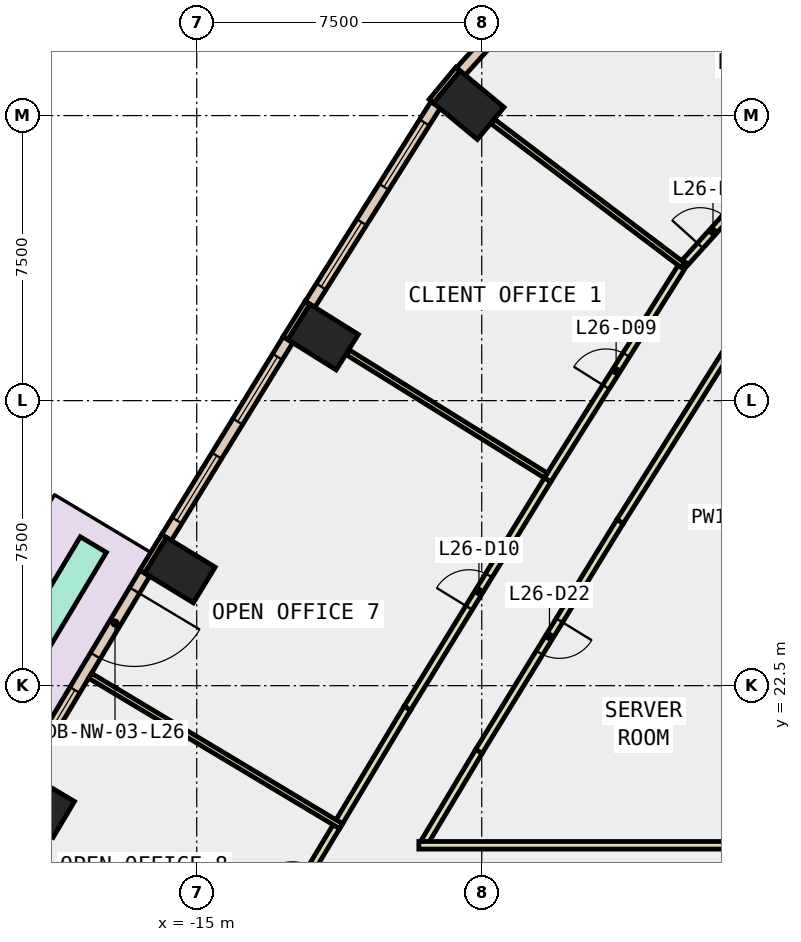
"""IFC4 building model, lengths in metres.
Left out: names, types, materials, properties, quantities, classifications, styles, units other than length and angle.
Written with IfcOpenShell. Run it as: python <this file> out.ifc"""

import sys

from ifc_helpers import new_model, si_unit, direction, frame, frame_2d, origin, origin_2d, place, context, subcontext, project, spatial, rectangle, extrude, element, fill, save


model = new_model("IFC4")
c1 = context("Model", 3, precision=1e-05, world=origin(), true_north=direction((0.0, 1.0)))
c2 = subcontext(c1, "Body", "Model", "MODEL_VIEW")
j1 = project(units=[si_unit("LENGTHUNIT", "METRE"), si_unit("PLANEANGLEUNIT", "RADIAN")], contexts=[c1])
p1 = place(None, origin())
s1 = spatial("IfcSite", under=j1, at=p1, CompositionType="ELEMENT")
p2 = place(p1, origin())
s2 = spatial("IfcBuilding", under=s1, at=p2, CompositionType="ELEMENT")
p3 = place(p2, frame((0.0, 0.0, 120.2)))
s3 = spatial("IfcBuildingStorey", under=s2, at=p3, CompositionType="ELEMENT", Elevation=120.2)
for number, where, z_axis, x_axis in (
    (1, (-7.842, 37.774, -0.4), (0.0, 0.0, 1.0), (0.638, 0.77, 0.0)),
    (2, (-11.675, 31.673, -0.4), (0.0, 0.0, 1.0), (0.53, 0.848, 0.0)),
    (3, (-15.442, 25.539, -0.4), (0.0, 0.0, 1.0), (0.52, 0.854, 0.0)),
    (4, (-19.143, 19.364, -0.4), (0.0, 0.0, 1.0), (0.51, 0.86, 0.0)),
):
    element("IfcColumn", number, at=place(p3, frame(where, z_axis=z_axis, x_axis=x_axis)), inside=s3, PredefinedType="COLUMN", context=c2, shape_type="SweptSolid", body=[
        extrude(rectangle(XDim=1.1, YDim=1.5, at=origin_2d()), origin(), (0.0, 0.0, 1.0), 4.2),
    ])
p4 = place(p3, frame((-8.126, 38.724, 0.0), z_axis=(0.0, 0.0, 1.0), x_axis=(-0.638435351024, -0.769675452748, 0.0)))
e5 = element("IfcWall", 5, at=p4, inside=s3, PredefinedType="STANDARD", context=c2, shape_type="SweptSolid", body=[
    extrude(rectangle(XDim=1.099, YDim=0.15, at=frame_2d((0.55, 0.0))), origin(), (0.0, 0.0, 1.0), 3.8),
])
p5 = place(p3, frame((-12.083, 32.577, 0.0), z_axis=(0.0, 0.0, 1.0), x_axis=(-0.52997899071, -0.848010771987, 0.0)))
e6 = element("IfcWall", 6, at=p5, inside=s3, PredefinedType="STANDARD", context=c2, shape_type="SweptSolid", body=[
    extrude(rectangle(XDim=1.1, YDim=0.15, at=frame_2d((0.55, 0.0))), origin(), (0.0, 0.0, 1.0), 3.8),
])
p6 = place(p3, frame((-15.861, 26.438, 0.0), z_axis=(0.0, 0.0, 1.0), x_axis=(-0.519869515594, -0.854245682901, 0.0)))
e7 = element("IfcWall", 7, at=p6, inside=s3, PredefinedType="STANDARD", context=c2, shape_type="SweptSolid", body=[
    extrude(rectangle(XDim=1.1, YDim=0.15, at=frame_2d((0.55, 0.0))), origin(), (0.0, 0.0, 1.0), 3.8),
])
p7 = place(p3, frame((-5.445, 41.552, 0.0), z_axis=(0.0, 0.0, 1.0), x_axis=(-0.66966434159, -0.742663900834, 0.0)))
e8 = element("IfcWall", 8, at=p7, inside=s3, PredefinedType="STANDARD", context=c2, shape_type="SweptSolid", body=[
    extrude(rectangle(XDim=3.893, YDim=0.3, at=frame_2d((1.946, 0.0))), origin(), (0.0, 0.0, 1.0), 3.8),
])
p8 = place(p7, frame((1.246, 0.0, 0.9)))
e9 = element("IfcOpeningElement", 9, at=p8, cuts=e8, PredefinedType="OPENING", context=c2, shape_type="SweptSolid", body=[
    extrude(rectangle(XDim=1.4, YDim=2.6, at=frame_2d((0.7, 1.3))), frame((0.0, 0.16, 0.0), z_axis=(0.0, -1.0, 0.0), x_axis=(1.0, 0.0, 0.0)), (0.0, 0.0, 1.0), 0.32),
])
p9 = place(p3, frame((-8.714, 37.784, 0.0), z_axis=(0.0, 0.0, 1.0), x_axis=(-0.532699467907, -0.846304482377, 0.0)))
e10 = element("IfcWall", 10, at=p9, inside=s3, PredefinedType="STANDARD", context=c2, shape_type="SweptSolid", body=[
    extrude(rectangle(XDim=6.202, YDim=0.3, at=frame_2d((3.101, 0.0))), origin(), (0.0, 0.0, 1.0), 3.8),
])
p10 = place(p9, frame((0.551, 0.0, 0.9)))
e11 = element("IfcOpeningElement", 11, at=p10, cuts=e10, PredefinedType="OPENING", context=c2, shape_type="SweptSolid", body=[
    extrude(rectangle(XDim=2.0, YDim=2.6, at=frame_2d((1.0, 1.3))), frame((0.0, 0.16, 0.0), z_axis=(0.0, -1.0, 0.0), x_axis=(1.0, 0.0, 0.0)), (0.0, 0.0, 1.0), 0.32),
])
p11 = place(p9, frame((3.652, 0.0, 0.9)))
e12 = element("IfcOpeningElement", 12, at=p11, cuts=e10, PredefinedType="OPENING", context=c2, shape_type="SweptSolid", body=[
    extrude(rectangle(XDim=2.0, YDim=2.6, at=frame_2d((1.0, 1.3))), frame((0.0, 0.16, 0.0), z_axis=(0.0, -1.0, 0.0), x_axis=(1.0, 0.0, 0.0)), (0.0, 0.0, 1.0), 0.32),
])
p12 = place(p3, frame((-12.598, 31.603, 0.0), z_axis=(0.0, 0.0, 1.0), x_axis=(-0.523417276981, -0.852076495485, 0.0)))
e13 = element("IfcWall", 13, at=p12, inside=s3, PredefinedType="STANDARD", context=c2, shape_type="SweptSolid", body=[
    extrude(rectangle(XDim=6.11, YDim=0.3, at=frame_2d((3.055, 0.0))), origin(), (0.0, 0.0, 1.0), 3.8),
])
p13 = place(p12, frame((0.527, 0.0, 0.9)))
e14 = element("IfcOpeningElement", 14, at=p13, cuts=e13, PredefinedType="OPENING", context=c2, shape_type="SweptSolid", body=[
    extrude(rectangle(XDim=2.0, YDim=2.6, at=frame_2d((1.0, 1.3))), frame((0.0, 0.16, 0.0), z_axis=(0.0, -1.0, 0.0), x_axis=(1.0, 0.0, 0.0)), (0.0, 0.0, 1.0), 0.32),
])
p14 = place(p12, frame((3.582, 0.0, 0.9)))
e15 = element("IfcOpeningElement", 15, at=p14, cuts=e13, PredefinedType="OPENING", context=c2, shape_type="SweptSolid", body=[
    extrude(rectangle(XDim=2.0, YDim=2.6, at=frame_2d((1.0, 1.3))), frame((0.0, 0.16, 0.0), z_axis=(0.0, -1.0, 0.0), x_axis=(1.0, 0.0, 0.0)), (0.0, 0.0, 1.0), 0.32),
])
p15 = place(p3, frame((-16.365, 25.458, 0.0), z_axis=(0.0, 0.0, 1.0), x_axis=(-0.514078503149, -0.857743139057, 0.0)))
e16 = element("IfcWall", 16, at=p15, inside=s3, PredefinedType="STANDARD", context=c2, shape_type="SweptSolid", body=[
    extrude(rectangle(XDim=6.11, YDim=0.3, at=frame_2d((3.055, 0.0))), origin(), (0.0, 0.0, 1.0), 3.8),
])
p16 = place(p15, frame((0.528, 0.0, 0.0)))
e17 = element("IfcOpeningElement", 17, at=p16, cuts=e16, PredefinedType="OPENING", context=c2, shape_type="SweptSolid", body=[
    extrude(rectangle(XDim=2.0, YDim=2.4, at=frame_2d((1.0, 1.2))), frame((0.0, 0.16, 0.0), z_axis=(0.0, -1.0, 0.0), x_axis=(1.0, 0.0, 0.0)), (0.0, 0.0, 1.0), 0.32),
])
p17 = place(p15, frame((3.583, 0.0, 0.9)))
e18 = element("IfcOpeningElement", 18, at=p17, cuts=e16, PredefinedType="OPENING", context=c2, shape_type="SweptSolid", body=[
    extrude(rectangle(XDim=2.0, YDim=2.6, at=frame_2d((1.0, 1.3))), frame((0.0, 0.16, 0.0), z_axis=(0.0, -1.0, 0.0), x_axis=(1.0, 0.0, 0.0)), (0.0, 0.0, 1.0), 0.32),
])
p18 = place(p3, frame((-17.72, 26.212, 0.0), z_axis=(0.0, 0.0, 1.0), x_axis=(-0.514017743989, -0.857779551437, 0.0)))
e19 = element("IfcWall", 19, at=p18, inside=s3, PredefinedType="STANDARD", context=c2, shape_type="SweptSolid", body=[
    extrude(rectangle(XDim=6.01, YDim=0.8, at=frame_2d((3.005, 0.0))), origin(), (0.0, 0.0, 1.0), 0.8),
])
p19 = place(p3, frame((-0.398, 32.317, 0.0), z_axis=(0.0, 0.0, 1.0), x_axis=(-0.53276445777, -0.846263571553, 0.0)))
e20 = element("IfcWall", 20, at=p19, inside=s3, PredefinedType="PARTITIONING", context=c2, shape_type="SweptSolid", body=[
    extrude(rectangle(XDim=6.5, YDim=0.2, at=frame_2d((3.25, 0.0))), origin(), (0.0, 0.0, 1.0), 3.8),
])
p20 = place(p3, frame((-3.861, 26.816, 0.0), z_axis=(0.0, 0.0, 1.0), x_axis=(-0.523390991338, -0.852092641786, 0.0)))
e21 = element("IfcWall", 21, at=p20, inside=s3, PredefinedType="PARTITIONING", context=c2, shape_type="SweptSolid", body=[
    extrude(rectangle(XDim=7.098, YDim=0.2, at=frame_2d((3.549, 0.0))), origin(), (0.0, 0.0, 1.0), 3.8),
])
p21 = place(p20, frame((3.049, 0.0, 0.0)))
e22 = element("IfcOpeningElement", 22, at=p21, cuts=e21, PredefinedType="OPENING", context=c2, shape_type="SweptSolid", body=[
    extrude(rectangle(XDim=1.0, YDim=2.1, at=frame_2d((0.5, 1.05))), frame((0.0, 0.11, 0.0), z_axis=(0.0, -1.0, 0.0), x_axis=(1.0, 0.0, 0.0)), (0.0, 0.0, 1.0), 0.22),
])
p22 = place(p3, frame((-7.576, 20.768, 0.0), z_axis=(0.0, 0.0, 1.0), x_axis=(-0.513900868925, -0.857849577092, 0.0)))
e23 = element("IfcWall", 23, at=p22, inside=s3, PredefinedType="PARTITIONING", context=c2, shape_type="SweptSolid", body=[
    extrude(rectangle(XDim=2.777, YDim=0.2, at=frame_2d((1.388, 0.0))), origin(), (0.0, 0.0, 1.0), 3.8),
])
p23 = place(p3, frame((-2.145, 33.639, 0.0), z_axis=(0.0, 0.0, 1.0), x_axis=(0.66965737341, 0.742670184023, 0.0)))
e24 = element("IfcWall", 24, at=p23, inside=s3, PredefinedType="PARTITIONING", context=c2, shape_type="SweptSolid", body=[
    extrude(rectangle(XDim=2.18, YDim=0.2, at=frame_2d((1.09, 0.0))), origin(), (0.0, 0.0, 1.0), 3.8),
])
p24 = place(p23, frame((0.59, 0.0, 0.0)))
e25 = element("IfcOpeningElement", 25, at=p24, cuts=e24, PredefinedType="OPENING", context=c2, shape_type="SweptSolid", body=[
    extrude(rectangle(XDim=1.0, YDim=2.1, at=frame_2d((0.5, 1.05))), frame((0.0, 0.11, 0.0), z_axis=(0.0, -1.0, 0.0), x_axis=(1.0, 0.0, 0.0)), (0.0, 0.0, 1.0), 0.22),
])
p25 = place(p3, frame((-5.769, 27.915, 0.0), z_axis=(0.0, 0.0, 1.0), x_axis=(0.532800846123, 0.846240662206, 0.0)))
e26 = element("IfcWall", 26, at=p25, inside=s3, PredefinedType="PARTITIONING", context=c2, shape_type="SweptSolid", body=[
    extrude(rectangle(XDim=6.776, YDim=0.2, at=frame_2d((3.388, 0.0))), origin(), (0.0, 0.0, 1.0), 3.8),
])
p26 = place(p25, frame((2.888, 0.0, 0.0)))
e27 = element("IfcOpeningElement", 27, at=p26, cuts=e26, PredefinedType="OPENING", context=c2, shape_type="SweptSolid", body=[
    extrude(rectangle(XDim=1.0, YDim=2.1, at=frame_2d((0.5, 1.05))), frame((0.0, 0.11, 0.0), z_axis=(0.0, -1.0, 0.0), x_axis=(1.0, 0.0, 0.0)), (0.0, 0.0, 1.0), 0.22),
])
p27 = place(p3, frame((-11.249, 18.918, 0.0), z_axis=(0.0, 0.0, 1.0), x_axis=(0.513949903813, 0.857820200491, 0.0)))
e28 = element("IfcWall", 28, at=p27, inside=s3, PredefinedType="PARTITIONING", context=c2, shape_type="SweptSolid", body=[
    extrude(rectangle(XDim=3.487, YDim=0.2, at=frame_2d((1.743, 0.0))), origin(), (0.0, 0.0, 1.0), 3.8),
])
p28 = place(p3, frame((-9.457, 21.909, 0.0), z_axis=(0.0, 0.0, 1.0), x_axis=(0.523366731761, 0.852107542559, 0.0)))
e29 = element("IfcWall", 29, at=p28, inside=s3, PredefinedType="PARTITIONING", context=c2, shape_type="SweptSolid", body=[
    extrude(rectangle(XDim=7.049, YDim=0.2, at=frame_2d((3.524, 0.0))), origin(), (0.0, 0.0, 1.0), 3.8),
])
p29 = place(p28, frame((3.099, 0.0, 0.0)))
e30 = element("IfcOpeningElement", 30, at=p29, cuts=e29, PredefinedType="OPENING", context=c2, shape_type="SweptSolid", body=[
    extrude(rectangle(XDim=1.0, YDim=2.1, at=frame_2d((0.5, 1.05))), frame((0.0, 0.11, 0.0), z_axis=(0.0, -1.0, 0.0), x_axis=(1.0, 0.0, 0.0)), (0.0, 0.0, 1.0), 0.22),
])
p30 = place(p3, frame((-13.119, 15.799, 0.0), z_axis=(0.0, 0.0, 1.0), x_axis=(0.514155958966, 0.857696712049, 0.0)))
e31 = element("IfcWall", 31, at=p30, inside=s3, PredefinedType="PARTITIONING", context=c2, shape_type="SweptSolid", body=[
    extrude(rectangle(XDim=3.487, YDim=0.2, at=frame_2d((1.744, 0.0))), origin(), (0.0, 0.0, 1.0), 3.8),
])
p31 = place(p30, frame((1.244, 0.0, 0.0)))
e32 = element("IfcOpeningElement", 32, at=p31, cuts=e31, PredefinedType="OPENING", context=c2, shape_type="SweptSolid", body=[
    extrude(rectangle(XDim=1.0, YDim=2.1, at=frame_2d((0.5, 1.05))), frame((0.0, 0.11, 0.0), z_axis=(0.0, -1.0, 0.0), x_axis=(1.0, 0.0, 0.0)), (0.0, 0.0, 1.0), 0.22),
])
p32 = place(p3, frame((-9.155, 18.3, 0.0), z_axis=(0.0, 0.0, 1.0), x_axis=(1.0, 0.0, 0.0)))
e33 = element("IfcWall", 33, at=p32, inside=s3, PredefinedType="PARTITIONING", context=c2, shape_type="SweptSolid", body=[
    extrude(rectangle(XDim=8.755, YDim=0.2, at=frame_2d((4.377, 0.0))), origin(), (0.0, 0.0, 1.0), 3.8),
])
p33 = place(p3, frame((-2.212, 33.565, 0.0), z_axis=(0.0, 0.0, 1.0), x_axis=(-0.797488074979, 0.603334708322, 0.0)))
e34 = element("IfcWall", 34, at=p33, inside=s3, PredefinedType="PARTITIONING", context=c2, shape_type="SweptSolid", body=[
    extrude(rectangle(XDim=6.257, YDim=0.15, at=frame_2d((3.128, 0.0))), origin(), (0.0, 0.0, 1.0), 3.8),
])
p34 = place(p3, frame((-5.814, 28.031, 0.0), z_axis=(0.0, 0.0, 1.0), x_axis=(-0.849222099047, 0.528035819324, 0.0)))
e35 = element("IfcWall", 35, at=p34, inside=s3, PredefinedType="PARTITIONING", context=c2, shape_type="SweptSolid", body=[
    extrude(rectangle(XDim=6.13, YDim=0.15, at=frame_2d((3.065, 0.0))), origin(), (0.0, 0.0, 1.0), 3.8),
])
p35 = place(p3, frame((-11.202, 18.803, 0.0), z_axis=(0.0, 0.0, 1.0), x_axis=(-0.857778149162, 0.514020084062, 0.0)))
e36 = element("IfcWall", 36, at=p35, inside=s3, PredefinedType="PARTITIONING", context=c2, shape_type="SweptSolid", body=[
    extrude(rectangle(XDim=7.7, YDim=0.15, at=frame_2d((3.85, 0.0))), origin(), (0.0, 0.0, 1.0), 3.8),
])
p36 = place(p10, origin())
e37 = element("IfcWindow", 37, at=p36, inside=s3, PartitioningType="SINGLE_PANEL", PredefinedType="WINDOW", context=c2, shape_type="SweptSolid", body=[
    extrude(rectangle(XDim=2.0, YDim=2.6, at=frame_2d((1.0, 1.3))), frame((0.0, 0.03, 0.0), z_axis=(0.0, -1.0, 0.0), x_axis=(1.0, 0.0, 0.0)), (0.0, 0.0, 1.0), 0.06),
])
fill(e11, e37)
p37 = place(p11, origin())
e38 = element("IfcWindow", 38, at=p37, inside=s3, PartitioningType="SINGLE_PANEL", PredefinedType="WINDOW", context=c2, shape_type="SweptSolid", body=[
    extrude(rectangle(XDim=2.0, YDim=2.6, at=frame_2d((1.0, 1.3))), frame((0.0, 0.03, 0.0), z_axis=(0.0, -1.0, 0.0), x_axis=(1.0, 0.0, 0.0)), (0.0, 0.0, 1.0), 0.06),
])
fill(e12, e38)
p38 = place(p13, origin())
e39 = element("IfcWindow", 39, at=p38, inside=s3, PartitioningType="SINGLE_PANEL", PredefinedType="WINDOW", context=c2, shape_type="SweptSolid", body=[
    extrude(rectangle(XDim=2.0, YDim=2.6, at=frame_2d((1.0, 1.3))), frame((0.0, 0.03, 0.0), z_axis=(0.0, -1.0, 0.0), x_axis=(1.0, 0.0, 0.0)), (0.0, 0.0, 1.0), 0.06),
])
fill(e14, e39)
p39 = place(p14, origin())
e40 = element("IfcWindow", 40, at=p39, inside=s3, PartitioningType="SINGLE_PANEL", PredefinedType="WINDOW", context=c2, shape_type="SweptSolid", body=[
    extrude(rectangle(XDim=2.0, YDim=2.6, at=frame_2d((1.0, 1.3))), frame((0.0, 0.03, 0.0), z_axis=(0.0, -1.0, 0.0), x_axis=(1.0, 0.0, 0.0)), (0.0, 0.0, 1.0), 0.06),
])
fill(e15, e40)
p40 = place(p16, origin())
e41 = element("IfcDoor", 41, at=p40, inside=s3, OperationType="SLIDING_TO_LEFT", PredefinedType="DOOR", context=c2, shape_type="SweptSolid", body=[
    extrude(rectangle(XDim=2.0, YDim=2.4, at=frame_2d((1.0, 1.2))), frame((0.0, 0.025, 0.0), z_axis=(0.0, -1.0, 0.0), x_axis=(1.0, 0.0, 0.0)), (0.0, 0.0, 1.0), 0.05),
])
fill(e17, e41)
p41 = place(p17, origin())
e42 = element("IfcWindow", 42, at=p41, inside=s3, PartitioningType="SINGLE_PANEL", PredefinedType="WINDOW", context=c2, shape_type="SweptSolid", body=[
    extrude(rectangle(XDim=2.0, YDim=2.6, at=frame_2d((1.0, 1.3))), frame((0.0, 0.03, 0.0), z_axis=(0.0, -1.0, 0.0), x_axis=(1.0, 0.0, 0.0)), (0.0, 0.0, 1.0), 0.06),
])
fill(e18, e42)
p42 = place(p24, origin())
e43 = element("IfcDoor", 43, at=p42, inside=s3, OperationType="SINGLE_SWING_LEFT", PredefinedType="DOOR", context=c2, shape_type="SweptSolid", body=[
    extrude(rectangle(XDim=1.0, YDim=2.1, at=frame_2d((0.5, 1.05))), frame((0.0, 0.025, 0.0), z_axis=(0.0, -1.0, 0.0), x_axis=(1.0, 0.0, 0.0)), (0.0, 0.0, 1.0), 0.05),
])
fill(e25, e43)
p43 = place(p26, origin())
e44 = element("IfcDoor", 44, at=p43, inside=s3, OperationType="SINGLE_SWING_LEFT", PredefinedType="DOOR", context=c2, shape_type="SweptSolid", body=[
    extrude(rectangle(XDim=1.0, YDim=2.1, at=frame_2d((0.5, 1.05))), frame((0.0, 0.025, 0.0), z_axis=(0.0, -1.0, 0.0), x_axis=(1.0, 0.0, 0.0)), (0.0, 0.0, 1.0), 0.05),
])
fill(e27, e44)
p44 = place(p29, origin())
e45 = element("IfcDoor", 45, at=p44, inside=s3, OperationType="SINGLE_SWING_LEFT", PredefinedType="DOOR", context=c2, shape_type="SweptSolid", body=[
    extrude(rectangle(XDim=1.0, YDim=2.1, at=frame_2d((0.5, 1.05))), frame((0.0, 0.025, 0.0), z_axis=(0.0, -1.0, 0.0), x_axis=(1.0, 0.0, 0.0)), (0.0, 0.0, 1.0), 0.05),
])
fill(e30, e45)
p45 = place(p21, origin())
e46 = element("IfcDoor", 46, at=p45, inside=s3, OperationType="SINGLE_SWING_LEFT", PredefinedType="DOOR", context=c2, shape_type="SweptSolid", body=[
    extrude(rectangle(XDim=1.0, YDim=2.1, at=frame_2d((0.5, 1.05))), frame((0.0, 0.025, 0.0), z_axis=(0.0, -1.0, 0.0), x_axis=(1.0, 0.0, 0.0)), (0.0, 0.0, 1.0), 0.05),
])
fill(e22, e46)
save(model, sys.argv[1])
